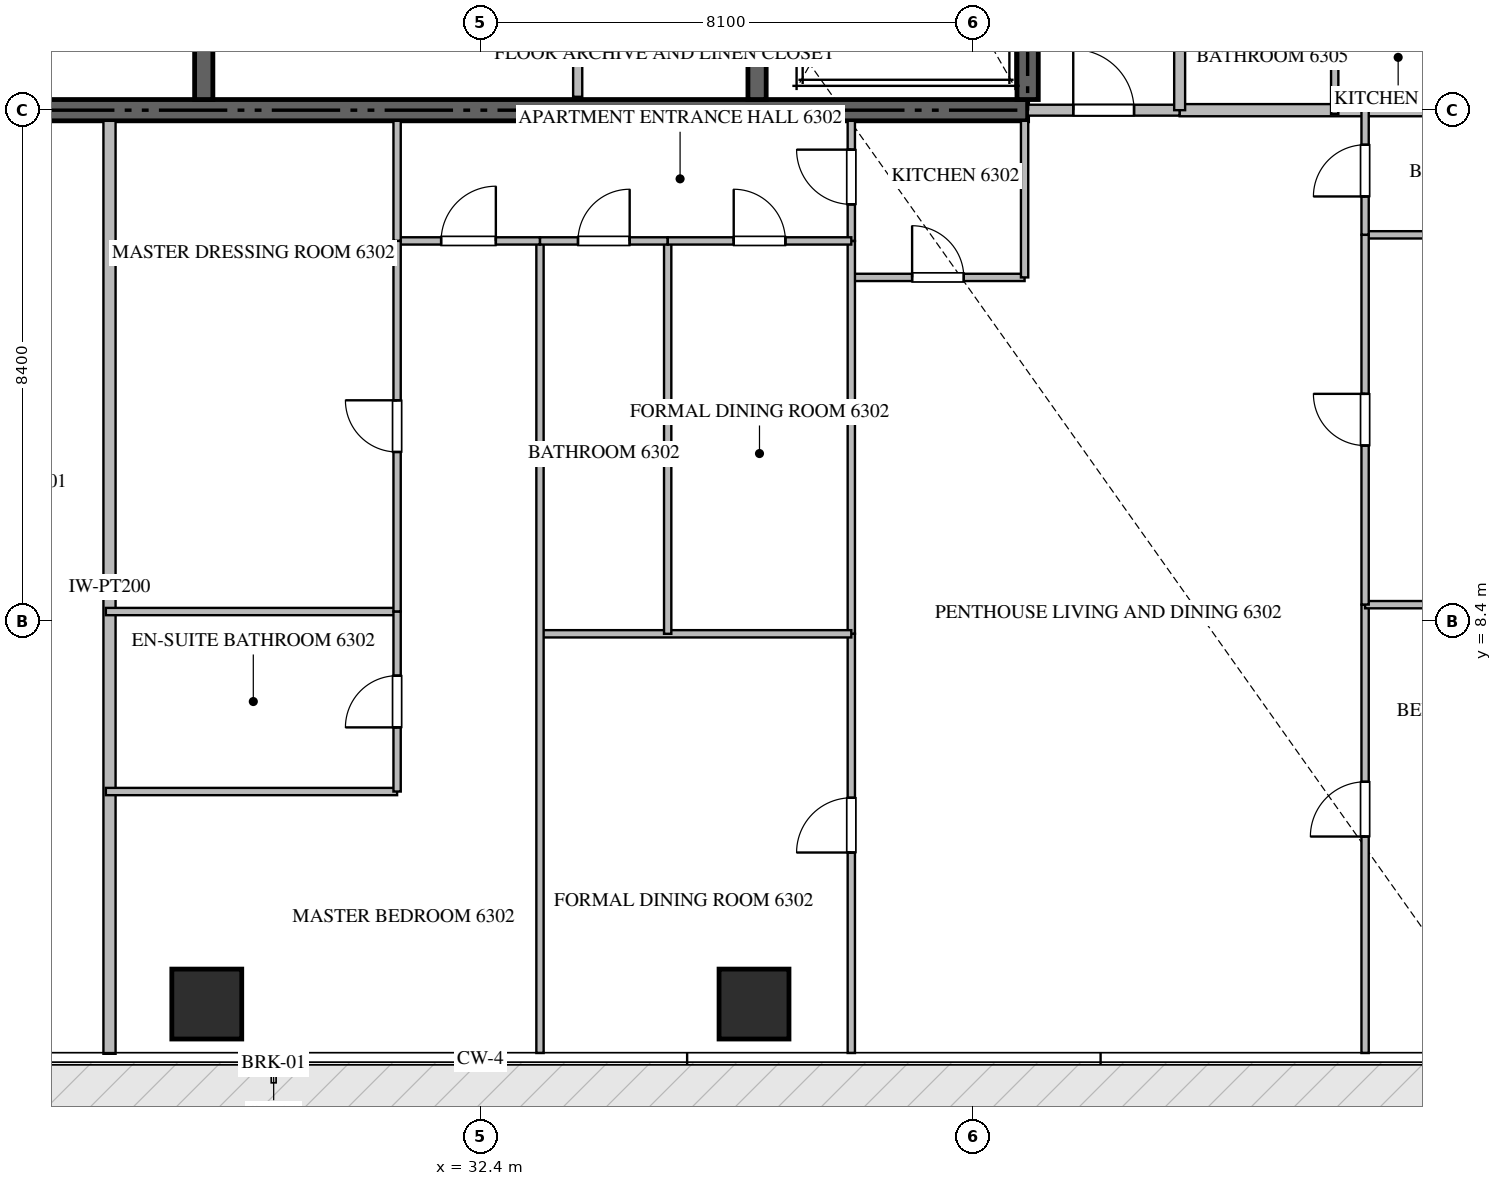
"""IFC4 building model, lengths in metres.
Left out: names, types, materials, properties, quantities, classifications, styles, units other than length and angle.
Written with IfcOpenShell. Run it as: python <this file> out.ifc"""

import sys

from ifc_helpers import new_model, si_unit, direction, frame, frame_2d, origin, origin_2d, place, context, subcontext, project, spatial, rectangle, extrude, source, transform, mapped, element, fill, save


model = new_model("IFC4")
c1 = context("Model", 3, precision=1e-05, world=origin(), true_north=direction((0.0, 1.0)))
c2 = subcontext(c1, "Body", "Model", "MODEL_VIEW")
j1 = project(units=[si_unit("LENGTHUNIT", "METRE"), si_unit("PLANEANGLEUNIT", "RADIAN")], contexts=[c1])
p1 = place(None, origin())
s1 = spatial("IfcSite", under=j1, at=p1, CompositionType="ELEMENT")
p2 = place(p1, origin())
s2 = spatial("IfcBuilding", under=s1, at=p2, CompositionType="ELEMENT")
p3 = place(p2, frame((0.0, 0.0, 252.8)))
s3 = spatial("IfcBuildingStorey", under=s2, at=p3, CompositionType="ELEMENT", Elevation=252.8)
p4 = place(p3, frame((23.4, 16.8, -0.26), z_axis=(0.0, 0.0, 1.0), x_axis=(1.0, 0.0, 0.0)))
e1 = element("IfcWall", 1, at=p4, inside=s3, PredefinedType="SHEAR", context=c2, shape_type="SweptSolid", body=[
    extrude(rectangle(XDim=18.0, YDim=0.35, at=frame_2d((9.0, 0.0))), origin(), (0.0, 0.0, 1.0), 3.848),
])
p5 = place(p3, frame((41.4, 16.975, -0.26), z_axis=(0.0, 0.0, 1.0), x_axis=(0.0, 1.0, 0.0)))
e2 = element("IfcWall", 2, at=p5, inside=s3, PredefinedType="SHEAR", context=c2, shape_type="SweptSolid", body=[
    extrude(rectangle(XDim=8.375, YDim=0.35, at=frame_2d((4.188, 0.0))), origin(), (0.0, 0.0, 1.0), 3.848),
])
p6 = place(p3, frame((27.85, 16.975, -0.26), z_axis=(0.0, 0.0, 1.0), x_axis=(0.0, 1.0, 0.0)))
e3 = element("IfcWall", 3, at=p6, inside=s3, PredefinedType="SHEAR", context=c2, shape_type="SweptSolid", body=[
    extrude(rectangle(XDim=4.875, YDim=0.3, at=frame_2d((2.438, 0.0))), origin(), (0.0, 0.0, 1.0), 3.848),
])
p7 = place(p3, frame((36.95, 16.975, -0.26), z_axis=(0.0, 0.0, 1.0), x_axis=(0.0, 1.0, 0.0)))
e4 = element("IfcWall", 4, at=p7, inside=s3, PredefinedType="SHEAR", context=c2, shape_type="SweptSolid", body=[
    extrude(rectangle(XDim=8.375, YDim=0.3, at=frame_2d((4.188, 0.0))), origin(), (0.0, 0.0, 1.0), 3.848),
])
m1 = source(origin(), c2, "Body", "SweptSolid", [
    extrude(rectangle(XDim=1.15, YDim=1.15, at=origin_2d()), origin(), (0.0, 0.0, 1.0), 3.85),
])
for number, where, z_axis, x_axis in (
    (5, (27.9, 2.1, -0.26), (0.0, 0.0, 1.0), (1.0, 0.0, 0.0)),
    (6, (36.9, 2.1, -0.26), (0.0, 0.0, 1.0), (1.0, 0.0, 0.0)),
):
    element("IfcColumn", number, at=place(p3, frame(where, z_axis=z_axis, x_axis=x_axis)), inside=s3, PredefinedType="COLUMN", context=c2, shape_type="MappedRepresentation", body=[
        mapped(m1, transform((0.0, 0.0, 0.0), scale=1.0)),
    ])
p8 = place(p3, frame((34.0, 17.02, 0.0), z_axis=(0.0, 0.0, 1.0), x_axis=(0.0, 1.0, 0.0)))
e7 = element("IfcWall", 7, at=p8, inside=s3, PredefinedType="PARTITIONING", context=c2, shape_type="SweptSolid", body=[
    extrude(rectangle(XDim=2.73, YDim=0.15, at=frame_2d((1.365, 0.0))), origin(), (0.0, 0.0, 1.0), 3.59),
])
p9 = place(p3, frame((26.3, 1.282, 0.0), z_axis=(0.0, 0.0, 1.0), x_axis=(0.0, 1.0, 0.0)))
e8 = element("IfcWall", 8, at=p9, inside=s3, PredefinedType="PARTITIONING", context=c2, shape_type="SweptSolid", body=[
    extrude(rectangle(XDim=15.343, YDim=0.2, at=frame_2d((7.671, 0.0))), origin(), (0.0, 0.0, 1.0), 3.59),
])
p10 = place(p3, frame((43.9, 16.8, 0.0), z_axis=(0.0, 0.0, 1.0), x_axis=(1.0, 0.0, 0.0)))
e9 = element("IfcWall", 9, at=p10, inside=s3, PredefinedType="PARTITIONING", context=c2, shape_type="SweptSolid", body=[
    extrude(rectangle(XDim=13.418, YDim=0.2, at=frame_2d((6.709, 0.0))), origin(), (0.0, 0.0, 1.0), 3.59),
])
p11 = place(p3, frame((41.402, 16.8, 0.0), z_axis=(0.0, 0.0, 1.0), x_axis=(1.0, 0.0, 0.0)))
e10 = element("IfcWall", 10, at=p11, inside=s3, PredefinedType="PARTITIONING", context=c2, shape_type="SweptSolid", body=[
    extrude(rectangle(XDim=2.496, YDim=0.18, at=frame_2d((1.248, 0.0))), origin(), (0.0, 0.0, 1.0), 3.59),
])
p12 = place(p11, frame((0.748, 0.0, 0.0)))
e11 = element("IfcOpeningElement", 11, at=p12, cuts=e10, PredefinedType="OPENING", context=c2, shape_type="SweptSolid", body=[
    extrude(rectangle(XDim=1.0, YDim=2.15, at=frame_2d((0.5, 1.075))), frame((0.0, 0.1, 0.0), z_axis=(0.0, -1.0, 0.0), x_axis=(1.0, 0.0, 0.0)), (0.0, 0.0, 1.0), 0.2),
])
p13 = place(p3, frame((43.9, 16.8, 0.0), z_axis=(0.0, 0.0, 1.0), x_axis=(0.0, 1.0, 0.0)))
e12 = element("IfcWall", 12, at=p13, inside=s3, PredefinedType="PARTITIONING", context=c2, shape_type="SweptSolid", body=[
    extrude(rectangle(XDim=16.8, YDim=0.18, at=frame_2d((8.4, 0.0))), origin(), (0.0, 0.0, 1.0), 3.59),
])
p14 = place(p13, frame((3.018, 0.0, 0.0)))
e13 = element("IfcOpeningElement", 13, at=p14, cuts=e12, PredefinedType="OPENING", context=c2, shape_type="SweptSolid", body=[
    extrude(rectangle(XDim=1.0, YDim=2.15, at=frame_2d((0.5, 1.075))), frame((0.0, 0.1, 0.0), z_axis=(0.0, -1.0, 0.0), x_axis=(1.0, 0.0, 0.0)), (0.0, 0.0, 1.0), 0.2),
])
p15 = place(p13, frame((9.18, 0.0, 0.0)))
e14 = element("IfcOpeningElement", 14, at=p15, cuts=e12, PredefinedType="OPENING", context=c2, shape_type="SweptSolid", body=[
    extrude(rectangle(XDim=1.0, YDim=2.15, at=frame_2d((0.5, 1.075))), frame((0.0, 0.1, 0.0), z_axis=(0.0, -1.0, 0.0), x_axis=(1.0, 0.0, 0.0)), (0.0, 0.0, 1.0), 0.2),
])
p16 = place(p13, frame((14.5, 0.0, 0.0)))
e15 = element("IfcOpeningElement", 15, at=p16, cuts=e12, PredefinedType="OPENING", context=c2, shape_type="SweptSolid", body=[
    extrude(rectangle(XDim=1.0, YDim=2.15, at=frame_2d((0.5, 1.075))), frame((0.0, 0.1, 0.0), z_axis=(0.0, -1.0, 0.0), x_axis=(1.0, 0.0, 0.0)), (0.0, 0.0, 1.0), 0.2),
])
p17 = place(p3, frame((38.5, 14.05, 0.0), z_axis=(0.0, 0.0, 1.0), x_axis=(1.0, 0.0, 0.0)))
e16 = element("IfcWall", 16, at=p17, inside=s3, PredefinedType="PARTITIONING", context=c2, shape_type="SweptSolid", body=[
    extrude(rectangle(XDim=2.85, YDim=0.12, at=frame_2d((1.425, 0.0))), origin(), (0.0, 0.0, 1.0), 3.59),
])
p18 = place(p17, frame((1.0, 0.0, 0.0)))
e17 = element("IfcOpeningElement", 17, at=p18, cuts=e16, PredefinedType="OPENING", context=c2, shape_type="SweptSolid", body=[
    extrude(rectangle(XDim=0.85, YDim=2.1, at=frame_2d((0.425, 1.05))), frame((0.0, 0.07, 0.0), z_axis=(0.0, -1.0, 0.0), x_axis=(1.0, 0.0, 0.0)), (0.0, 0.0, 1.0), 0.14),
])
p19 = place(p3, frame((41.35, 14.05, 0.0), z_axis=(0.0, 0.0, 1.0), x_axis=(0.0, 1.0, 0.0)))
e18 = element("IfcWall", 18, at=p19, inside=s3, PredefinedType="PARTITIONING", context=c2, shape_type="SweptSolid", body=[
    extrude(rectangle(XDim=2.575, YDim=0.12, at=frame_2d((1.288, 0.0))), origin(), (0.0, 0.0, 1.0), 3.59),
])
p20 = place(p3, frame((38.5, 14.65, 0.0), z_axis=(0.0, 0.0, 1.0), x_axis=(0.0, 1.0, 0.0)))
e19 = element("IfcWall", 19, at=p20, inside=s3, PredefinedType="PARTITIONING", context=c2, shape_type="SweptSolid", body=[
    extrude(rectangle(XDim=1.975, YDim=0.12, at=frame_2d((0.988, 0.0))), origin(), (0.0, 0.0, 1.0), 3.59),
])
p21 = place(p20, frame((0.601, 0.0, 0.0)))
e20 = element("IfcOpeningElement", 20, at=p21, cuts=e19, PredefinedType="OPENING", context=c2, shape_type="SweptSolid", body=[
    extrude(rectangle(XDim=0.9, YDim=2.1, at=frame_2d((0.45, 1.05))), frame((0.0, 0.07, 0.0), z_axis=(0.0, -1.0, 0.0), x_axis=(1.0, 0.0, 0.0)), (0.0, 0.0, 1.0), 0.14),
])
p22 = place(p3, frame((38.5, 1.295, 0.0), z_axis=(0.0, 0.0, 1.0), x_axis=(0.0, 1.0, 0.0)))
e21 = element("IfcWall", 21, at=p22, inside=s3, PredefinedType="PARTITIONING", context=c2, shape_type="SweptSolid", body=[
    extrude(rectangle(XDim=6.894, YDim=0.12, at=frame_2d((3.447, 0.0))), origin(), (0.0, 0.0, 1.0), 3.59),
])
p23 = place(p22, frame((3.297, 0.0, 0.0)))
e22 = element("IfcOpeningElement", 22, at=p23, cuts=e21, PredefinedType="OPENING", context=c2, shape_type="SweptSolid", body=[
    extrude(rectangle(XDim=0.9, YDim=2.1, at=frame_2d((0.45, 1.05))), frame((0.0, 0.07, 0.0), z_axis=(0.0, -1.0, 0.0), x_axis=(1.0, 0.0, 0.0)), (0.0, 0.0, 1.0), 0.14),
])
p24 = place(p3, frame((38.5, 8.191, 0.0), z_axis=(0.0, 0.0, 1.0), x_axis=(0.0, 1.0, 0.0)))
e23 = element("IfcWall", 23, at=p24, inside=s3, PredefinedType="PARTITIONING", context=c2, shape_type="SweptSolid", body=[
    extrude(rectangle(XDim=6.457, YDim=0.12, at=frame_2d((3.229, 0.0))), origin(), (0.0, 0.0, 1.0), 3.59),
])
p25 = place(p3, frame((33.38, 8.189, 0.0), z_axis=(0.0, 0.0, 1.0), x_axis=(1.0, 0.0, 0.0)))
e24 = element("IfcWall", 24, at=p25, inside=s3, PredefinedType="PARTITIONING", context=c2, shape_type="SweptSolid", body=[
    extrude(rectangle(XDim=5.12, YDim=0.12, at=frame_2d((2.56, 0.0))), origin(), (0.0, 0.0, 1.0), 3.59),
])
p26 = place(p3, frame((33.38, 1.295, 0.0), z_axis=(0.0, 0.0, 1.0), x_axis=(0.0, 1.0, 0.0)))
e25 = element("IfcWall", 25, at=p26, inside=s3, PredefinedType="PARTITIONING", context=c2, shape_type="SweptSolid", body=[
    extrude(rectangle(XDim=13.355, YDim=0.12, at=frame_2d((6.677, 0.0))), origin(), (0.0, 0.0, 1.0), 3.59),
])
p27 = place(p3, frame((35.48, 8.189, 0.0), z_axis=(0.0, 0.0, 1.0), x_axis=(0.0, 1.0, 0.0)))
e26 = element("IfcWall", 26, at=p27, inside=s3, PredefinedType="PARTITIONING", context=c2, shape_type="SweptSolid", body=[
    extrude(rectangle(XDim=6.461, YDim=0.12, at=frame_2d((3.23, 0.0))), origin(), (0.0, 0.0, 1.0), 3.59),
])
p28 = place(p3, frame((33.38, 14.65, 0.0), z_axis=(0.0, 0.0, 1.0), x_axis=(1.0, 0.0, 0.0)))
e27 = element("IfcWall", 27, at=p28, inside=s3, PredefinedType="PARTITIONING", context=c2, shape_type="SweptSolid", body=[
    extrude(rectangle(XDim=2.1, YDim=0.12, at=frame_2d((1.05, 0.0))), origin(), (0.0, 0.0, 1.0), 3.59),
])
p29 = place(p28, frame((0.625, 0.0, 0.0)))
e28 = element("IfcOpeningElement", 28, at=p29, cuts=e27, PredefinedType="OPENING", context=c2, shape_type="SweptSolid", body=[
    extrude(rectangle(XDim=0.85, YDim=2.1, at=frame_2d((0.425, 1.05))), frame((0.0, 0.07, 0.0), z_axis=(0.0, -1.0, 0.0), x_axis=(1.0, 0.0, 0.0)), (0.0, 0.0, 1.0), 0.14),
])
p30 = place(p3, frame((35.482, 14.65, 0.0), z_axis=(0.0, 0.0, 1.0), x_axis=(1.0, 0.0, 0.0)))
e29 = element("IfcWall", 29, at=p30, inside=s3, PredefinedType="PARTITIONING", context=c2, shape_type="SweptSolid", body=[
    extrude(rectangle(XDim=3.018, YDim=0.12, at=frame_2d((1.509, 0.0))), origin(), (0.0, 0.0, 1.0), 3.59),
])
p31 = place(p30, frame((1.084, 0.0, 0.0)))
e30 = element("IfcOpeningElement", 30, at=p31, cuts=e29, PredefinedType="OPENING", context=c2, shape_type="SweptSolid", body=[
    extrude(rectangle(XDim=0.85, YDim=2.1, at=frame_2d((0.425, 1.05))), frame((0.0, 0.07, 0.0), z_axis=(0.0, -1.0, 0.0), x_axis=(1.0, 0.0, 0.0)), (0.0, 0.0, 1.0), 0.14),
])
p32 = place(p3, frame((31.03, 14.65, 0.0), z_axis=(0.0, 0.0, 1.0), x_axis=(1.0, 0.0, 0.0)))
e31 = element("IfcWall", 31, at=p32, inside=s3, PredefinedType="PARTITIONING", context=c2, shape_type="SweptSolid", body=[
    extrude(rectangle(XDim=2.348, YDim=0.12, at=frame_2d((1.174, 0.0))), origin(), (0.0, 0.0, 1.0), 3.59),
])
p33 = place(p32, frame((0.724, 0.0, 0.0)))
e32 = element("IfcOpeningElement", 32, at=p33, cuts=e31, PredefinedType="OPENING", context=c2, shape_type="SweptSolid", body=[
    extrude(rectangle(XDim=0.9, YDim=2.1, at=frame_2d((0.45, 1.05))), frame((0.0, 0.07, 0.0), z_axis=(0.0, -1.0, 0.0), x_axis=(1.0, 0.0, 0.0)), (0.0, 0.0, 1.0), 0.14),
])
for number, where, z_axis, x_axis in (
    (33, (26.24, 5.595, 0.0), (0.0, 0.0, 1.0), (1.0, 0.0, 0.0)),
    (34, (26.24, 8.555, 0.0), (0.0, 0.0, 1.0), (1.0, 0.0, 0.0)),
):
    element("IfcWall", number, at=place(p3, frame(where, z_axis=z_axis, x_axis=x_axis)), inside=s3, PredefinedType="PARTITIONING", context=c2, shape_type="SweptSolid", body=[
        extrude(rectangle(XDim=4.79, YDim=0.12, at=frame_2d((2.395, 0.0))), origin(), (0.0, 0.0, 1.0), 3.59),
    ])
p34 = place(p3, frame((31.03, 5.595, 0.0), z_axis=(0.0, 0.0, 1.0), x_axis=(0.0, 1.0, 0.0)))
e35 = element("IfcWall", 35, at=p34, inside=s3, PredefinedType="PARTITIONING", context=c2, shape_type="SweptSolid", body=[
    extrude(rectangle(XDim=2.96, YDim=0.12, at=frame_2d((1.48, 0.0))), origin(), (0.0, 0.0, 1.0), 3.59),
])
p35 = place(p34, frame((1.055, 0.0, 0.0)))
e36 = element("IfcOpeningElement", 36, at=p35, cuts=e35, PredefinedType="OPENING", context=c2, shape_type="SweptSolid", body=[
    extrude(rectangle(XDim=0.85, YDim=2.1, at=frame_2d((0.425, 1.05))), frame((0.0, 0.07, 0.0), z_axis=(0.0, -1.0, 0.0), x_axis=(1.0, 0.0, 0.0)), (0.0, 0.0, 1.0), 0.14),
])
p36 = place(p3, frame((31.03, 8.557, 0.0), z_axis=(0.0, 0.0, 1.0), x_axis=(0.0, 1.0, 0.0)))
e37 = element("IfcWall", 37, at=p36, inside=s3, PredefinedType="PARTITIONING", context=c2, shape_type="SweptSolid", body=[
    extrude(rectangle(XDim=6.093, YDim=0.12, at=frame_2d((3.046, 0.0))), origin(), (0.0, 0.0, 1.0), 3.59),
])
p37 = place(p36, frame((2.622, 0.0, 0.0)))
e38 = element("IfcOpeningElement", 38, at=p37, cuts=e37, PredefinedType="OPENING", context=c2, shape_type="SweptSolid", body=[
    extrude(rectangle(XDim=0.85, YDim=2.1, at=frame_2d((0.425, 1.05))), frame((0.0, 0.07, 0.0), z_axis=(0.0, -1.0, 0.0), x_axis=(1.0, 0.0, 0.0)), (0.0, 0.0, 1.0), 0.14),
])
p38 = place(p3, frame((31.03, 14.652, 0.0), z_axis=(0.0, 0.0, 1.0), x_axis=(0.0, 1.0, 0.0)))
e39 = element("IfcWall", 39, at=p38, inside=s3, PredefinedType="PARTITIONING", context=c2, shape_type="SweptSolid", body=[
    extrude(rectangle(XDim=1.973, YDim=0.12, at=frame_2d((0.986, 0.0))), origin(), (0.0, 0.0, 1.0), 3.59),
])
p39 = place(p3, frame((46.95, 1.295, 0.0), z_axis=(0.0, 0.0, 1.0), x_axis=(0.0, 1.0, 0.0)))
e40 = element("IfcWall", 40, at=p39, inside=s3, PredefinedType="PARTITIONING", context=c2, shape_type="SweptSolid", body=[
    extrude(rectangle(XDim=7.373, YDim=0.12, at=frame_2d((3.687, 0.0))), origin(), (0.0, 0.0, 1.0), 3.59),
])
p40 = place(p39, frame((3.56, 0.0, 0.0)))
e41 = element("IfcOpeningElement", 41, at=p40, cuts=e40, PredefinedType="OPENING", context=c2, shape_type="SweptSolid", body=[
    extrude(rectangle(XDim=0.9, YDim=2.1, at=frame_2d((0.45, 1.05))), frame((0.0, 0.07, 0.0), z_axis=(0.0, -1.0, 0.0), x_axis=(1.0, 0.0, 0.0)), (0.0, 0.0, 1.0), 0.14),
])
p41 = place(p3, frame((46.95, 8.668, 0.0), z_axis=(0.0, 0.0, 1.0), x_axis=(1.0, 0.0, 0.0)))
e42 = element("IfcWall", 42, at=p41, inside=s3, PredefinedType="PARTITIONING", context=c2, shape_type="SweptSolid", body=[
    extrude(rectangle(XDim=6.355, YDim=0.12, at=frame_2d((3.177, 0.0))), origin(), (0.0, 0.0, 1.0), 3.59),
])
p42 = place(p3, frame((46.95, 14.75, 0.0), z_axis=(0.0, 0.0, 1.0), x_axis=(1.0, 0.0, 0.0)))
e43 = element("IfcWall", 43, at=p42, inside=s3, PredefinedType="PARTITIONING", context=c2, shape_type="SweptSolid", body=[
    extrude(rectangle(XDim=3.2, YDim=0.12, at=frame_2d((1.6, 0.0))), origin(), (0.0, 0.0, 1.0), 3.59),
])
p43 = place(p3, frame((46.95, 8.67, 0.0), z_axis=(0.0, 0.0, 1.0), x_axis=(0.0, 1.0, 0.0)))
e44 = element("IfcWall", 44, at=p43, inside=s3, PredefinedType="PARTITIONING", context=c2, shape_type="SweptSolid", body=[
    extrude(rectangle(XDim=6.08, YDim=0.12, at=frame_2d((3.04, 0.0))), origin(), (0.0, 0.0, 1.0), 3.59),
])
p44 = place(p43, frame((2.615, 0.0, 0.0)))
e45 = element("IfcOpeningElement", 45, at=p44, cuts=e44, PredefinedType="OPENING", context=c2, shape_type="SweptSolid", body=[
    extrude(rectangle(XDim=0.85, YDim=2.1, at=frame_2d((0.425, 1.05))), frame((0.0, 0.07, 0.0), z_axis=(0.0, -1.0, 0.0), x_axis=(1.0, 0.0, 0.0)), (0.0, 0.0, 1.0), 0.14),
])
p45 = place(p3, frame((46.95, 14.752, 0.0), z_axis=(0.0, 0.0, 1.0), x_axis=(0.0, 1.0, 0.0)))
e46 = element("IfcWall", 46, at=p45, inside=s3, PredefinedType="PARTITIONING", context=c2, shape_type="SweptSolid", body=[
    extrude(rectangle(XDim=2.108, YDim=0.12, at=frame_2d((1.054, 0.0))), origin(), (0.0, 0.0, 1.0), 3.59),
])
p46 = place(p45, frame((0.629, 0.0, 0.0)))
e47 = element("IfcOpeningElement", 47, at=p46, cuts=e46, PredefinedType="OPENING", context=c2, shape_type="SweptSolid", body=[
    extrude(rectangle(XDim=0.85, YDim=2.1, at=frame_2d((0.425, 1.05))), frame((0.0, 0.07, 0.0), z_axis=(0.0, -1.0, 0.0), x_axis=(1.0, 0.0, 0.0)), (0.0, 0.0, 1.0), 0.14),
])
p47 = place(p3, frame((46.45, 16.74, 0.0), z_axis=(0.0, 0.0, 1.0), x_axis=(0.0, 1.0, 0.0)))
e48 = element("IfcWall", 48, at=p47, inside=s3, PredefinedType="PARTITIONING", context=c2, shape_type="SweptSolid", body=[
    extrude(rectangle(XDim=2.31, YDim=0.12, at=frame_2d((1.155, 0.0))), origin(), (0.0, 0.0, 1.0), 3.59),
])
m2 = source(origin(), c2, "Body", "SweptSolid", [
    extrude(rectangle(XDim=1.0, YDim=2.15, at=frame_2d((0.5, 1.075))), frame((0.0, 0.025, 0.0), z_axis=(0.0, -1.0, 0.0), x_axis=(1.0, 0.0, 0.0)), (0.0, 0.0, 1.0), 0.05),
])
p48 = place(p12, origin())
e49 = element("IfcDoor", 49, at=p48, inside=s3, OperationType="SINGLE_SWING_LEFT", PredefinedType="DOOR", context=c2, shape_type="MappedRepresentation", body=[
    mapped(m2, transform((0.0, 0.0, 0.0), scale=1.0)),
])
fill(e11, e49)
m3 = source(origin(), c2, "Body", "SweptSolid", [
    extrude(rectangle(XDim=0.85, YDim=2.1, at=frame_2d((0.425, 1.05))), frame((0.0, 0.025, 0.0), z_axis=(0.0, -1.0, 0.0), x_axis=(1.0, 0.0, 0.0)), (0.0, 0.0, 1.0), 0.05),
])
p49 = place(p18, origin())
e50 = element("IfcDoor", 50, at=p49, inside=s3, OperationType="SINGLE_SWING_LEFT", PredefinedType="DOOR", context=c2, shape_type="MappedRepresentation", body=[
    mapped(m3, transform((0.0, 0.0, 0.0), scale=1.0)),
])
fill(e17, e50)
m4 = source(origin(), c2, "Body", "SweptSolid", [
    extrude(rectangle(XDim=0.9, YDim=2.1, at=frame_2d((0.45, 1.05))), frame((0.0, 0.025, 0.0), z_axis=(0.0, -1.0, 0.0), x_axis=(1.0, 0.0, 0.0)), (0.0, 0.0, 1.0), 0.05),
])
p50 = place(p21, origin())
e51 = element("IfcDoor", 51, at=p50, inside=s3, OperationType="SINGLE_SWING_RIGHT", PredefinedType="DOOR", context=c2, shape_type="MappedRepresentation", body=[
    mapped(m4, transform((0.0, 0.0, 0.0), scale=1.0)),
])
fill(e20, e51)
p51 = place(p23, origin())
e52 = element("IfcDoor", 52, at=p51, inside=s3, OperationType="SINGLE_SWING_LEFT", PredefinedType="DOOR", context=c2, shape_type="MappedRepresentation", body=[
    mapped(m4, transform((0.0, 0.0, 0.0), scale=1.0)),
])
fill(e22, e52)
p52 = place(p29, origin())
e53 = element("IfcDoor", 53, at=p52, inside=s3, OperationType="SINGLE_SWING_RIGHT", PredefinedType="DOOR", context=c2, shape_type="MappedRepresentation", body=[
    mapped(m3, transform((0.0, 0.0, 0.0), scale=1.0)),
])
fill(e28, e53)
p53 = place(p31, origin())
e54 = element("IfcDoor", 54, at=p53, inside=s3, OperationType="SINGLE_SWING_LEFT", PredefinedType="DOOR", context=c2, shape_type="MappedRepresentation", body=[
    mapped(m3, transform((0.0, 0.0, 0.0), scale=1.0)),
])
fill(e30, e54)
p54 = place(p33, origin())
e55 = element("IfcDoor", 55, at=p54, inside=s3, OperationType="SINGLE_SWING_RIGHT", PredefinedType="DOOR", context=c2, shape_type="MappedRepresentation", body=[
    mapped(m4, transform((0.0, 0.0, 0.0), scale=1.0)),
])
fill(e32, e55)
p55 = place(p35, origin())
e56 = element("IfcDoor", 56, at=p55, inside=s3, OperationType="SINGLE_SWING_LEFT", PredefinedType="DOOR", context=c2, shape_type="MappedRepresentation", body=[
    mapped(m3, transform((0.0, 0.0, 0.0), scale=1.0)),
])
fill(e36, e56)
p56 = place(p37, origin())
e57 = element("IfcDoor", 57, at=p56, inside=s3, OperationType="SINGLE_SWING_RIGHT", PredefinedType="DOOR", context=c2, shape_type="MappedRepresentation", body=[
    mapped(m3, transform((0.0, 0.0, 0.0), scale=1.0)),
])
fill(e38, e57)
p57 = place(p40, origin())
e58 = element("IfcDoor", 58, at=p57, inside=s3, OperationType="SINGLE_SWING_LEFT", PredefinedType="DOOR", context=c2, shape_type="MappedRepresentation", body=[
    mapped(m4, transform((0.0, 0.0, 0.0), scale=1.0)),
])
fill(e41, e58)
p58 = place(p44, origin())
e59 = element("IfcDoor", 59, at=p58, inside=s3, OperationType="SINGLE_SWING_RIGHT", PredefinedType="DOOR", context=c2, shape_type="MappedRepresentation", body=[
    mapped(m3, transform((0.0, 0.0, 0.0), scale=1.0)),
])
fill(e45, e59)
p59 = place(p46, origin())
e60 = element("IfcDoor", 60, at=p59, inside=s3, OperationType="SINGLE_SWING_LEFT", PredefinedType="DOOR", context=c2, shape_type="MappedRepresentation", body=[
    mapped(m3, transform((0.0, 0.0, 0.0), scale=1.0)),
])
fill(e47, e60)
save(model, sys.argv[1])
